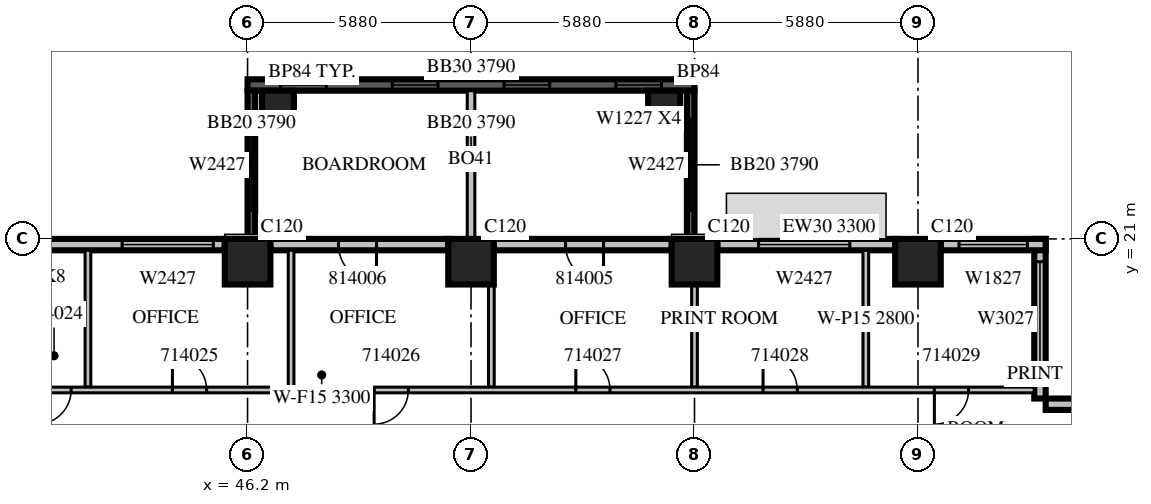
"""IFC4 building model, lengths in metres.
Left out: names, types, materials, properties, quantities, classifications, styles, units other than length and angle.
Written with IfcOpenShell. Run it as: python <this file> out.ifc"""

import sys

from ifc_helpers import new_model, si_unit, direction, frame, frame_2d, origin, origin_2d, place, context, subcontext, project, spatial, rectangle, extrude, source, transform, mapped, element, fill, save


model = new_model("IFC4")
c1 = context("Model", 3, precision=1e-05, world=origin(), true_north=direction((0.0, 1.0)))
c2 = subcontext(c1, "Body", "Model", "MODEL_VIEW")
j1 = project(units=[si_unit("LENGTHUNIT", "METRE"), si_unit("PLANEANGLEUNIT", "RADIAN")], contexts=[c1])
p1 = place(None, origin())
s1 = spatial("IfcSite", under=j1, at=p1, CompositionType="ELEMENT")
p2 = place(p1, origin())
s2 = spatial("IfcBuilding", under=s1, at=p2, CompositionType="ELEMENT")
p3 = place(p2, frame((0.0, 0.0, 69.9)))
s3 = spatial("IfcBuildingStorey", under=s2, at=p3, CompositionType="ELEMENT", Elevation=69.9)
m1 = source(origin(), c2, "Body", "SweptSolid", [
    extrude(rectangle(XDim=1.2, YDim=1.2, at=origin_2d()), origin(), (0.0, 0.0, 1.0), 4.2),
])
for number, where, z_axis, x_axis in (
    (1, (46.2, 20.4, 0.0), (0.0, 0.0, 1.0), (1.0, 0.0, 0.0)),
    (2, (52.08, 20.4, 0.0), (0.0, 0.0, 1.0), (1.0, 0.0, 0.0)),
    (3, (57.96, 20.4, 0.0), (0.0, 0.0, 1.0), (1.0, 0.0, 0.0)),
    (4, (63.84, 20.4, 0.0), (0.0, 0.0, 1.0), (1.0, 0.0, 0.0)),
):
    element("IfcColumn", number, at=place(p3, frame(where, z_axis=z_axis, x_axis=x_axis)), inside=s3, PredefinedType="COLUMN", context=c2, shape_type="MappedRepresentation", body=[
        mapped(m1, transform((0.0, 0.0, 0.0), scale=1.0)),
    ])
m2 = source(origin(), c2, "Body", "SweptSolid", [
    extrude(rectangle(XDim=0.84, YDim=0.84, at=origin_2d()), origin(), (0.0, 0.0, 1.0), 4.2),
])
for number, where, z_axis, x_axis in (
    (5, (47.0, 24.48, 0.0), (0.0, 0.0, 1.0), (1.0, 0.0, 0.0)),
    (6, (57.16, 24.48, 0.0), (0.0, 0.0, 1.0), (1.0, 0.0, 0.0)),
):
    element("IfcColumn", number, at=place(p3, frame(where, z_axis=z_axis, x_axis=x_axis)), inside=s3, PredefinedType="COLUMN", context=c2, shape_type="MappedRepresentation", body=[
        mapped(m2, transform((0.0, 0.0, 0.0), scale=1.0)),
    ])
m3 = source(origin(), c2, "Body", "SweptSolid", [
    extrude(rectangle(XDim=11.76, YDim=0.3, at=frame_2d((5.88, 0.0))), origin(), (0.0, 0.0, 1.0), 3.79),
])
p4 = place(p3, frame((57.96, 25.05, 0.0), z_axis=(0.0, 0.0, 1.0), x_axis=(-1.0, 0.0, 0.0)))
e7 = element("IfcWall", 7, at=p4, inside=s3, PredefinedType="SOLIDWALL", context=c2, shape_type="MappedRepresentation", body=[
    mapped(m3, transform((0.0, 0.0, 0.0), scale=1.0)),
])
m4 = source(origin(), c2, "Body", "SweptSolid", [
    extrude(rectangle(XDim=1.2, YDim=2.7, at=frame_2d((0.6, 1.35))), frame((0.0, 0.16, 0.0), z_axis=(0.0, -1.0, 0.0), x_axis=(1.0, 0.0, 0.0)), (0.0, 0.0, 1.0), 0.32),
])
p5 = place(p4, frame((0.87, 0.0, 0.6)))
e8 = element("IfcOpeningElement", 8, at=p5, cuts=e7, PredefinedType="OPENING", context=c2, shape_type="MappedRepresentation", body=[
    mapped(m4, transform((0.0, 0.0, 0.0), scale=1.0)),
])
p6 = place(p4, frame((3.81, 0.0, 0.6)))
e9 = element("IfcOpeningElement", 9, at=p6, cuts=e7, PredefinedType="OPENING", context=c2, shape_type="MappedRepresentation", body=[
    mapped(m4, transform((0.0, 0.0, 0.0), scale=1.0)),
])
p7 = place(p4, frame((6.75, 0.0, 0.6)))
e10 = element("IfcOpeningElement", 10, at=p7, cuts=e7, PredefinedType="OPENING", context=c2, shape_type="MappedRepresentation", body=[
    mapped(m4, transform((0.0, 0.0, 0.0), scale=1.0)),
])
p8 = place(p4, frame((9.69, 0.0, 0.6)))
e11 = element("IfcOpeningElement", 11, at=p8, cuts=e7, PredefinedType="OPENING", context=c2, shape_type="MappedRepresentation", body=[
    mapped(m4, transform((0.0, 0.0, 0.0), scale=1.0)),
])
m5 = source(origin(), c2, "Body", "SweptSolid", [
    extrude(rectangle(XDim=3.9, YDim=0.2, at=frame_2d((1.95, 0.0))), origin(), (0.0, 0.0, 1.0), 3.79),
])
p9 = place(p3, frame((52.08, 21.0, 0.0), z_axis=(0.0, 0.0, 1.0), x_axis=(0.0, 1.0, 0.0)))
e12 = element("IfcWall", 12, at=p9, inside=s3, PredefinedType="SOLIDWALL", context=c2, shape_type="MappedRepresentation", body=[
    mapped(m5, transform((0.0, 0.0, 0.0), scale=1.0)),
])
m6 = source(origin(), c2, "Body", "SweptSolid", [
    extrude(rectangle(XDim=3.9, YDim=0.2, at=frame_2d((1.95, 0.0))), origin(), (0.0, 0.0, 1.0), 3.79),
])
p10 = place(p3, frame((57.86, 21.0, 0.0), z_axis=(0.0, 0.0, 1.0), x_axis=(0.0, 1.0, 0.0)))
e13 = element("IfcWall", 13, at=p10, inside=s3, PredefinedType="SOLIDWALL", context=c2, shape_type="MappedRepresentation", body=[
    mapped(m6, transform((0.0, 0.0, 0.0), scale=1.0)),
])
m7 = source(origin(), c2, "Body", "SweptSolid", [
    extrude(rectangle(XDim=2.4, YDim=2.7, at=frame_2d((1.2, 1.35))), frame((0.0, 0.11, 0.0), z_axis=(0.0, -1.0, 0.0), x_axis=(1.0, 0.0, 0.0)), (0.0, 0.0, 1.0), 0.22),
])
p11 = place(p10, frame((0.75, 0.0, 0.6)))
e14 = element("IfcOpeningElement", 14, at=p11, cuts=e13, PredefinedType="OPENING", context=c2, shape_type="MappedRepresentation", body=[
    mapped(m7, transform((0.0, 0.0, 0.0), scale=1.0)),
])
p12 = place(p3, frame((46.3, 21.0, 0.0), z_axis=(0.0, 0.0, 1.0), x_axis=(0.0, 1.0, 0.0)))
e15 = element("IfcWall", 15, at=p12, inside=s3, PredefinedType="SOLIDWALL", context=c2, shape_type="MappedRepresentation", body=[
    mapped(m6, transform((0.0, 0.0, 0.0), scale=1.0)),
])
p13 = place(p12, frame((0.75, 0.0, 0.6)))
e16 = element("IfcOpeningElement", 16, at=p13, cuts=e15, PredefinedType="OPENING", context=c2, shape_type="MappedRepresentation", body=[
    mapped(m7, transform((0.0, 0.0, 0.0), scale=1.0)),
])
m8 = source(origin(), c2, "Body", "SweptSolid", [
    extrude(rectangle(XDim=4.2, YDim=0.3, at=frame_2d((2.1, 0.0))), origin(), (0.0, 0.0, 1.0), 3.8),
])
p14 = place(p3, frame((71.4, 16.65, 0.0), z_axis=(0.0, 0.0, 1.0), x_axis=(-1.0, 0.0, 0.0)))
e17 = element("IfcWall", 17, at=p14, inside=s3, PredefinedType="STANDARD", context=c2, shape_type="MappedRepresentation", body=[
    mapped(m8, transform((0.0, 0.0, 0.0), scale=1.0)),
])
p15 = place(p14, frame((0.66, 0.0, 0.6)))
e18 = element("IfcOpeningElement", 18, at=p15, cuts=e17, PredefinedType="OPENING", context=c2, shape_type="MappedRepresentation", body=[
    mapped(m4, transform((0.0, 0.0, 0.0), scale=1.0)),
])
p16 = place(p3, frame((67.05, 16.8, 0.0), z_axis=(0.0, 0.0, 1.0), x_axis=(0.0, 1.0, 0.0)))
e19 = element("IfcWall", 19, at=p16, inside=s3, PredefinedType="STANDARD", context=c2, shape_type="MappedRepresentation", body=[
    mapped(m8, transform((0.0, 0.0, 0.0), scale=1.0)),
])
m9 = source(origin(), c2, "Body", "SweptSolid", [
    extrude(rectangle(XDim=3.0, YDim=2.7, at=frame_2d((1.5, 1.35))), frame((0.0, 0.16, 0.0), z_axis=(0.0, -1.0, 0.0), x_axis=(1.0, 0.0, 0.0)), (0.0, 0.0, 1.0), 0.32),
])
p17 = place(p16, frame((0.6, 0.0, 0.6)))
e20 = element("IfcOpeningElement", 20, at=p17, cuts=e19, PredefinedType="OPENING", context=c2, shape_type="MappedRepresentation", body=[
    mapped(m9, transform((0.0, 0.0, 0.0), scale=1.0)),
])
m10 = source(origin(), c2, "Body", "SweptSolid", [
    extrude(rectangle(XDim=2.76, YDim=0.3, at=frame_2d((1.38, 0.0))), origin(), (0.0, 0.0, 1.0), 3.8),
])
p18 = place(p3, frame((67.2, 20.85, 0.0), z_axis=(0.0, 0.0, 1.0), x_axis=(-1.0, 0.0, 0.0)))
e21 = element("IfcWall", 21, at=p18, inside=s3, PredefinedType="STANDARD", context=c2, shape_type="MappedRepresentation", body=[
    mapped(m10, transform((0.0, 0.0, 0.0), scale=1.0)),
])
m11 = source(origin(), c2, "Body", "SweptSolid", [
    extrude(rectangle(XDim=1.8, YDim=2.7, at=frame_2d((0.9, 1.35))), frame((0.0, 0.16, 0.0), z_axis=(0.0, -1.0, 0.0), x_axis=(1.0, 0.0, 0.0)), (0.0, 0.0, 1.0), 0.32),
])
p19 = place(p18, frame((0.48, 0.0, 0.6)))
e22 = element("IfcOpeningElement", 22, at=p19, cuts=e21, PredefinedType="OPENING", context=c2, shape_type="MappedRepresentation", body=[
    mapped(m11, transform((0.0, 0.0, 0.0), scale=1.0)),
])
m12 = source(origin(), c2, "Body", "SweptSolid", [
    extrude(rectangle(XDim=4.68, YDim=0.3, at=frame_2d((2.34, 0.0))), origin(), (0.0, 0.0, 1.0), 3.3),
])
p20 = place(p3, frame((63.24, 20.85, 0.0), z_axis=(0.0, 0.0, 1.0), x_axis=(-1.0, 0.0, 0.0)))
e23 = element("IfcWall", 23, at=p20, inside=s3, PredefinedType="STANDARD", context=c2, shape_type="MappedRepresentation", body=[
    mapped(m12, transform((0.0, 0.0, 0.0), scale=1.0)),
])
m13 = source(origin(), c2, "Body", "SweptSolid", [
    extrude(rectangle(XDim=2.4, YDim=2.7, at=frame_2d((1.2, 1.35))), frame((0.0, 0.16, 0.0), z_axis=(0.0, -1.0, 0.0), x_axis=(1.0, 0.0, 0.0)), (0.0, 0.0, 1.0), 0.32),
])
p21 = place(p20, frame((1.194, 0.0, 0.6)))
e24 = element("IfcOpeningElement", 24, at=p21, cuts=e23, PredefinedType="OPENING", context=c2, shape_type="MappedRepresentation", body=[
    mapped(m13, transform((0.0, 0.0, 0.0), scale=1.0)),
])
m14 = source(origin(), c2, "Body", "SweptSolid", [
    extrude(rectangle(XDim=4.68, YDim=0.3, at=frame_2d((2.34, 0.0))), origin(), (0.0, 0.0, 1.0), 3.8),
])
p22 = place(p3, frame((57.36, 20.85, 0.0), z_axis=(0.0, 0.0, 1.0), x_axis=(-1.0, 0.0, 0.0)))
e25 = element("IfcWall", 25, at=p22, inside=s3, PredefinedType="STANDARD", context=c2, shape_type="MappedRepresentation", body=[
    mapped(m14, transform((0.0, 0.0, 0.0), scale=1.0)),
])
m15 = source(origin(), c2, "Body", "SweptSolid", [
    extrude(rectangle(XDim=1.0, YDim=2.1, at=frame_2d((0.5, 1.05))), frame((0.0, 0.16, 0.0), z_axis=(0.0, -1.0, 0.0), x_axis=(1.0, 0.0, 0.0)), (0.0, 0.0, 1.0), 0.32),
])
p23 = place(p22, frame((1.793, 0.0, 0.0)))
e26 = element("IfcOpeningElement", 26, at=p23, cuts=e25, PredefinedType="OPENING", context=c2, shape_type="MappedRepresentation", body=[
    mapped(m15, transform((0.0, 0.0, 0.0), scale=1.0)),
])
p24 = place(p3, frame((51.48, 20.85, 0.0), z_axis=(0.0, 0.0, 1.0), x_axis=(-1.0, 0.0, 0.0)))
e27 = element("IfcWall", 27, at=p24, inside=s3, PredefinedType="STANDARD", context=c2, shape_type="MappedRepresentation", body=[
    mapped(m14, transform((0.0, 0.0, 0.0), scale=1.0)),
])
p25 = place(p24, frame((1.887, 0.0, 0.0)))
e28 = element("IfcOpeningElement", 28, at=p25, cuts=e27, PredefinedType="OPENING", context=c2, shape_type="MappedRepresentation", body=[
    mapped(m15, transform((0.0, 0.0, 0.0), scale=1.0)),
])
m16 = source(origin(), c2, "Body", "SweptSolid", [
    extrude(rectangle(XDim=7.2, YDim=0.3, at=frame_2d((3.6, 0.0))), origin(), (0.0, 0.0, 1.0), 3.8),
])
p26 = place(p3, frame((45.6, 20.85, 0.0), z_axis=(0.0, 0.0, 1.0), x_axis=(-1.0, 0.0, 0.0)))
e29 = element("IfcWall", 29, at=p26, inside=s3, PredefinedType="STANDARD", context=c2, shape_type="MappedRepresentation", body=[
    mapped(m16, transform((0.0, 0.0, 0.0), scale=1.0)),
])
p27 = place(p26, frame((0.3, 0.0, 0.6)))
e30 = element("IfcOpeningElement", 30, at=p27, cuts=e29, PredefinedType="OPENING", context=c2, shape_type="MappedRepresentation", body=[
    mapped(m13, transform((0.0, 0.0, 0.0), scale=1.0)),
])
m17 = source(origin(), c2, "Body", "SweptSolid", [
    extrude(rectangle(XDim=3.6, YDim=0.15, at=frame_2d((1.8, 0.0))), origin(), (0.0, 0.0, 1.0), 3.8),
])
p28 = place(p3, frame((47.345, 20.7, 0.0), z_axis=(0.0, 0.0, 1.0), x_axis=(0.0, -1.0, 0.0)))
e31 = element("IfcWall", 31, at=p28, inside=s3, PredefinedType="PARTITIONING", context=c2, shape_type="MappedRepresentation", body=[
    mapped(m17, transform((0.0, 0.0, 0.0), scale=1.0)),
])
m18 = source(origin(), c2, "Body", "SweptSolid", [
    extrude(rectangle(XDim=2.701, YDim=0.15, at=frame_2d((1.351, 0.0))), origin(), (0.0, 0.0, 1.0), 3.8),
])
p29 = place(p3, frame((52.615, 19.801, 0.0), z_axis=(0.0, 0.0, 1.0), x_axis=(0.0, -1.0, 0.0)))
e32 = element("IfcWall", 32, at=p29, inside=s3, PredefinedType="PARTITIONING", context=c2, shape_type="MappedRepresentation", body=[
    mapped(m18, transform((0.0, 0.0, 0.0), scale=1.0)),
])
m19 = source(origin(), c2, "Body", "SweptSolid", [
    extrude(rectangle(XDim=3.6, YDim=0.15, at=frame_2d((1.8, 0.0))), origin(), (0.0, 0.0, 1.0), 2.8),
])
p30 = place(p3, frame((62.468, 20.7, 0.0), z_axis=(0.0, 0.0, 1.0), x_axis=(0.0, -1.0, 0.0)))
e33 = element("IfcWall", 33, at=p30, inside=s3, PredefinedType="PARTITIONING", context=c2, shape_type="MappedRepresentation", body=[
    mapped(m19, transform((0.0, 0.0, 0.0), scale=1.0)),
])
p31 = place(p3, frame((42.0, 17.1, 0.0), z_axis=(0.0, 0.0, 1.0), x_axis=(0.0, 1.0, 0.0)))
e34 = element("IfcWall", 34, at=p31, inside=s3, PredefinedType="PARTITIONING", context=c2, shape_type="MappedRepresentation", body=[
    mapped(m17, transform((0.0, 0.0, 0.0), scale=1.0)),
])
p32 = place(p3, frame((57.96, 17.1, 0.0), z_axis=(0.0, 0.0, 1.0), x_axis=(0.0, 1.0, 0.0)))
e35 = element("IfcWall", 35, at=p32, inside=s3, PredefinedType="PARTITIONING", context=c2, shape_type="MappedRepresentation", body=[
    mapped(m18, transform((0.0, 0.0, 0.0), scale=1.0)),
])
m20 = source(origin(), c2, "Body", "SweptSolid", [
    extrude(rectangle(XDim=37.5, YDim=0.15, at=frame_2d((18.75, 0.0))), origin(), (0.0, 0.0, 1.0), 3.3),
])
p33 = place(p3, frame((29.4, 17.025, 0.0), z_axis=(0.0, 0.0, 1.0), x_axis=(1.0, 0.0, 0.0)))
e36 = element("IfcWall", 36, at=p33, inside=s3, PredefinedType="PARTITIONING", context=c2, shape_type="MappedRepresentation", body=[
    mapped(m20, transform((0.0, 0.0, 0.0), scale=1.0)),
])
m21 = source(origin(), c2, "Body", "SweptSolid", [
    extrude(rectangle(XDim=1.0, YDim=2.1, at=frame_2d((0.5, 1.05))), frame((0.0, 0.085, 0.0), z_axis=(0.0, -1.0, 0.0), x_axis=(1.0, 0.0, 0.0)), (0.0, 0.0, 1.0), 0.17),
])
p34 = place(p33, frame((1.357, 0.0, 0.0)))
e37 = element("IfcOpeningElement", 37, at=p34, cuts=e36, PredefinedType="OPENING", context=c2, shape_type="MappedRepresentation", body=[
    mapped(m21, transform((0.0, 0.0, 0.0), scale=1.0)),
])
p35 = place(p33, frame((4.669, 0.0, 0.0)))
e38 = element("IfcOpeningElement", 38, at=p35, cuts=e36, PredefinedType="OPENING", context=c2, shape_type="MappedRepresentation", body=[
    mapped(m21, transform((0.0, 0.0, 0.0), scale=1.0)),
])
p36 = place(p33, frame((7.012, 0.0, 0.0)))
e39 = element("IfcOpeningElement", 39, at=p36, cuts=e36, PredefinedType="OPENING", context=c2, shape_type="MappedRepresentation", body=[
    mapped(m21, transform((0.0, 0.0, 0.0), scale=1.0)),
])
m22 = source(origin(), c2, "Body", "SweptSolid", [
    extrude(rectangle(XDim=0.9, YDim=2.1, at=frame_2d((0.45, 1.05))), frame((0.0, 0.085, 0.0), z_axis=(0.0, -1.0, 0.0), x_axis=(1.0, 0.0, 0.0)), (0.0, 0.0, 1.0), 0.17),
])
p37 = place(p33, frame((9.158, 0.0, 0.0)))
e40 = element("IfcOpeningElement", 40, at=p37, cuts=e36, PredefinedType="OPENING", context=c2, shape_type="MappedRepresentation", body=[
    mapped(m22, transform((0.0, 0.0, 0.0), scale=1.0)),
])
p38 = place(p33, frame((11.258, 0.0, 0.0)))
e41 = element("IfcOpeningElement", 41, at=p38, cuts=e36, PredefinedType="OPENING", context=c2, shape_type="MappedRepresentation", body=[
    mapped(m22, transform((0.0, 0.0, 0.0), scale=1.0)),
])
p39 = place(p33, frame((14.822, 0.0, 0.0)))
e42 = element("IfcOpeningElement", 42, at=p39, cuts=e36, PredefinedType="OPENING", context=c2, shape_type="MappedRepresentation", body=[
    mapped(m22, transform((0.0, 0.0, 0.0), scale=1.0)),
])
p40 = place(p33, frame((20.13, 0.0, 0.0)))
e43 = element("IfcOpeningElement", 43, at=p40, cuts=e36, PredefinedType="OPENING", context=c2, shape_type="MappedRepresentation", body=[
    mapped(m22, transform((0.0, 0.0, 0.0), scale=1.0)),
])
p41 = place(p33, frame((25.438, 0.0, 0.0)))
e44 = element("IfcOpeningElement", 44, at=p41, cuts=e36, PredefinedType="OPENING", context=c2, shape_type="MappedRepresentation", body=[
    mapped(m22, transform((0.0, 0.0, 0.0), scale=1.0)),
])
p42 = place(p33, frame((30.364, 0.0, 0.0)))
e45 = element("IfcOpeningElement", 45, at=p42, cuts=e36, PredefinedType="OPENING", context=c2, shape_type="MappedRepresentation", body=[
    mapped(m22, transform((0.0, 0.0, 0.0), scale=1.0)),
])
p43 = place(p33, frame((34.871, 0.0, 0.0)))
e46 = element("IfcOpeningElement", 46, at=p43, cuts=e36, PredefinedType="OPENING", context=c2, shape_type="MappedRepresentation", body=[
    mapped(m22, transform((0.0, 0.0, 0.0), scale=1.0)),
])
m23 = source(origin(), c2, "Body", "SweptSolid", [
    extrude(rectangle(XDim=1.2, YDim=2.7, at=frame_2d((0.6, 1.35))), frame((0.0, 0.03, 0.0), z_axis=(0.0, -1.0, 0.0), x_axis=(1.0, 0.0, 0.0)), (0.0, 0.0, 1.0), 0.06),
])
p44 = place(p5, origin())
e47 = element("IfcWindow", 47, at=p44, inside=s3, PartitioningType="SINGLE_PANEL", PredefinedType="WINDOW", context=c2, shape_type="MappedRepresentation", body=[
    mapped(m23, transform((0.0, 0.0, 0.0), scale=1.0)),
])
fill(e8, e47)
p45 = place(p6, origin())
e48 = element("IfcWindow", 48, at=p45, inside=s3, PartitioningType="SINGLE_PANEL", PredefinedType="WINDOW", context=c2, shape_type="MappedRepresentation", body=[
    mapped(m23, transform((0.0, 0.0, 0.0), scale=1.0)),
])
fill(e9, e48)
p46 = place(p7, origin())
e49 = element("IfcWindow", 49, at=p46, inside=s3, PartitioningType="SINGLE_PANEL", PredefinedType="WINDOW", context=c2, shape_type="MappedRepresentation", body=[
    mapped(m23, transform((0.0, 0.0, 0.0), scale=1.0)),
])
fill(e10, e49)
p47 = place(p8, origin())
e50 = element("IfcWindow", 50, at=p47, inside=s3, PartitioningType="SINGLE_PANEL", PredefinedType="WINDOW", context=c2, shape_type="MappedRepresentation", body=[
    mapped(m23, transform((0.0, 0.0, 0.0), scale=1.0)),
])
fill(e11, e50)
m24 = source(origin(), c2, "Body", "SweptSolid", [
    extrude(rectangle(XDim=2.4, YDim=2.7, at=frame_2d((1.2, 1.35))), frame((0.0, 0.03, 0.0), z_axis=(0.0, -1.0, 0.0), x_axis=(1.0, 0.0, 0.0)), (0.0, 0.0, 1.0), 0.06),
])
p48 = place(p11, origin())
e51 = element("IfcWindow", 51, at=p48, inside=s3, PartitioningType="SINGLE_PANEL", PredefinedType="WINDOW", context=c2, shape_type="MappedRepresentation", body=[
    mapped(m24, transform((0.0, 0.0, 0.0), scale=1.0)),
])
fill(e14, e51)
p49 = place(p13, origin())
e52 = element("IfcWindow", 52, at=p49, inside=s3, PartitioningType="SINGLE_PANEL", PredefinedType="WINDOW", context=c2, shape_type="MappedRepresentation", body=[
    mapped(m24, transform((0.0, 0.0, 0.0), scale=1.0)),
])
fill(e16, e52)
m25 = source(origin(), c2, "Body", "SweptSolid", [
    extrude(rectangle(XDim=3.0, YDim=2.7, at=frame_2d((1.5, 1.35))), frame((0.0, 0.03, 0.0), z_axis=(0.0, -1.0, 0.0), x_axis=(1.0, 0.0, 0.0)), (0.0, 0.0, 1.0), 0.06),
])
p50 = place(p17, origin())
e53 = element("IfcWindow", 53, at=p50, inside=s3, PartitioningType="SINGLE_PANEL", PredefinedType="WINDOW", context=c2, shape_type="MappedRepresentation", body=[
    mapped(m25, transform((0.0, 0.0, 0.0), scale=1.0)),
])
fill(e20, e53)
p51 = place(p21, origin())
e54 = element("IfcWindow", 54, at=p51, inside=s3, PartitioningType="SINGLE_PANEL", PredefinedType="WINDOW", context=c2, shape_type="MappedRepresentation", body=[
    mapped(m24, transform((0.0, 0.0, 0.0), scale=1.0)),
])
fill(e24, e54)
m26 = source(origin(), c2, "Body", "SweptSolid", [
    extrude(rectangle(XDim=1.8, YDim=2.7, at=frame_2d((0.9, 1.35))), frame((0.0, 0.03, 0.0), z_axis=(0.0, -1.0, 0.0), x_axis=(1.0, 0.0, 0.0)), (0.0, 0.0, 1.0), 0.06),
])
p52 = place(p19, origin())
e55 = element("IfcWindow", 55, at=p52, inside=s3, PartitioningType="SINGLE_PANEL", PredefinedType="WINDOW", context=c2, shape_type="MappedRepresentation", body=[
    mapped(m26, transform((0.0, 0.0, 0.0), scale=1.0)),
])
fill(e22, e55)
p53 = place(p27, origin())
e56 = element("IfcWindow", 56, at=p53, inside=s3, PartitioningType="SINGLE_PANEL", PredefinedType="WINDOW", context=c2, shape_type="MappedRepresentation", body=[
    mapped(m24, transform((0.0, 0.0, 0.0), scale=1.0)),
])
fill(e30, e56)
m27 = source(origin(), c2, "Body", "SweptSolid", [
    extrude(rectangle(XDim=0.9, YDim=2.1, at=frame_2d((0.45, 1.05))), frame((0.0, 0.025, 0.0), z_axis=(0.0, -1.0, 0.0), x_axis=(1.0, 0.0, 0.0)), (0.0, 0.0, 1.0), 0.05),
])
p54 = place(p38, origin())
e57 = element("IfcDoor", 57, at=p54, inside=s3, OperationType="SINGLE_SWING_RIGHT", PredefinedType="DOOR", context=c2, shape_type="MappedRepresentation", body=[
    mapped(m27, transform((0.0, 0.0, 0.0), scale=1.0)),
])
fill(e41, e57)
p55 = place(p39, origin())
e58 = element("IfcDoor", 58, at=p55, inside=s3, OperationType="SINGLE_SWING_LEFT", PredefinedType="DOOR", context=c2, shape_type="MappedRepresentation", body=[
    mapped(m27, transform((0.0, 0.0, 0.0), scale=1.0)),
])
fill(e42, e58)
p56 = place(p40, origin())
e59 = element("IfcDoor", 59, at=p56, inside=s3, OperationType="SINGLE_SWING_RIGHT", PredefinedType="DOOR", context=c2, shape_type="MappedRepresentation", body=[
    mapped(m27, transform((0.0, 0.0, 0.0), scale=1.0)),
])
fill(e43, e59)
p57 = place(p41, origin())
e60 = element("IfcDoor", 60, at=p57, inside=s3, OperationType="SINGLE_SWING_LEFT", PredefinedType="DOOR", context=c2, shape_type="MappedRepresentation", body=[
    mapped(m27, transform((0.0, 0.0, 0.0), scale=1.0)),
])
fill(e44, e60)
p58 = place(p42, origin())
e61 = element("IfcDoor", 61, at=p58, inside=s3, OperationType="SINGLE_SWING_LEFT", PredefinedType="DOOR", context=c2, shape_type="MappedRepresentation", body=[
    mapped(m27, transform((0.0, 0.0, 0.0), scale=1.0)),
])
fill(e45, e61)
p59 = place(p43, origin())
e62 = element("IfcDoor", 62, at=p59, inside=s3, OperationType="SINGLE_SWING_RIGHT", PredefinedType="DOOR", context=c2, shape_type="MappedRepresentation", body=[
    mapped(m27, transform((0.0, 0.0, 0.0), scale=1.0)),
])
fill(e46, e62)
m28 = source(origin(), c2, "Body", "SweptSolid", [
    extrude(rectangle(XDim=1.0, YDim=2.1, at=frame_2d((0.5, 1.05))), frame((0.0, 0.025, 0.0), z_axis=(0.0, -1.0, 0.0), x_axis=(1.0, 0.0, 0.0)), (0.0, 0.0, 1.0), 0.05),
])
p60 = place(p23, origin())
e63 = element("IfcDoor", 63, at=p60, inside=s3, OperationType="SINGLE_SWING_LEFT", PredefinedType="DOOR", context=c2, shape_type="MappedRepresentation", body=[
    mapped(m28, transform((0.0, 0.0, 0.0), scale=1.0)),
])
fill(e26, e63)
p61 = place(p25, origin())
e64 = element("IfcDoor", 64, at=p61, inside=s3, OperationType="SINGLE_SWING_LEFT", PredefinedType="DOOR", context=c2, shape_type="MappedRepresentation", body=[
    mapped(m28, transform((0.0, 0.0, 0.0), scale=1.0)),
])
fill(e28, e64)
save(model, sys.argv[1])
